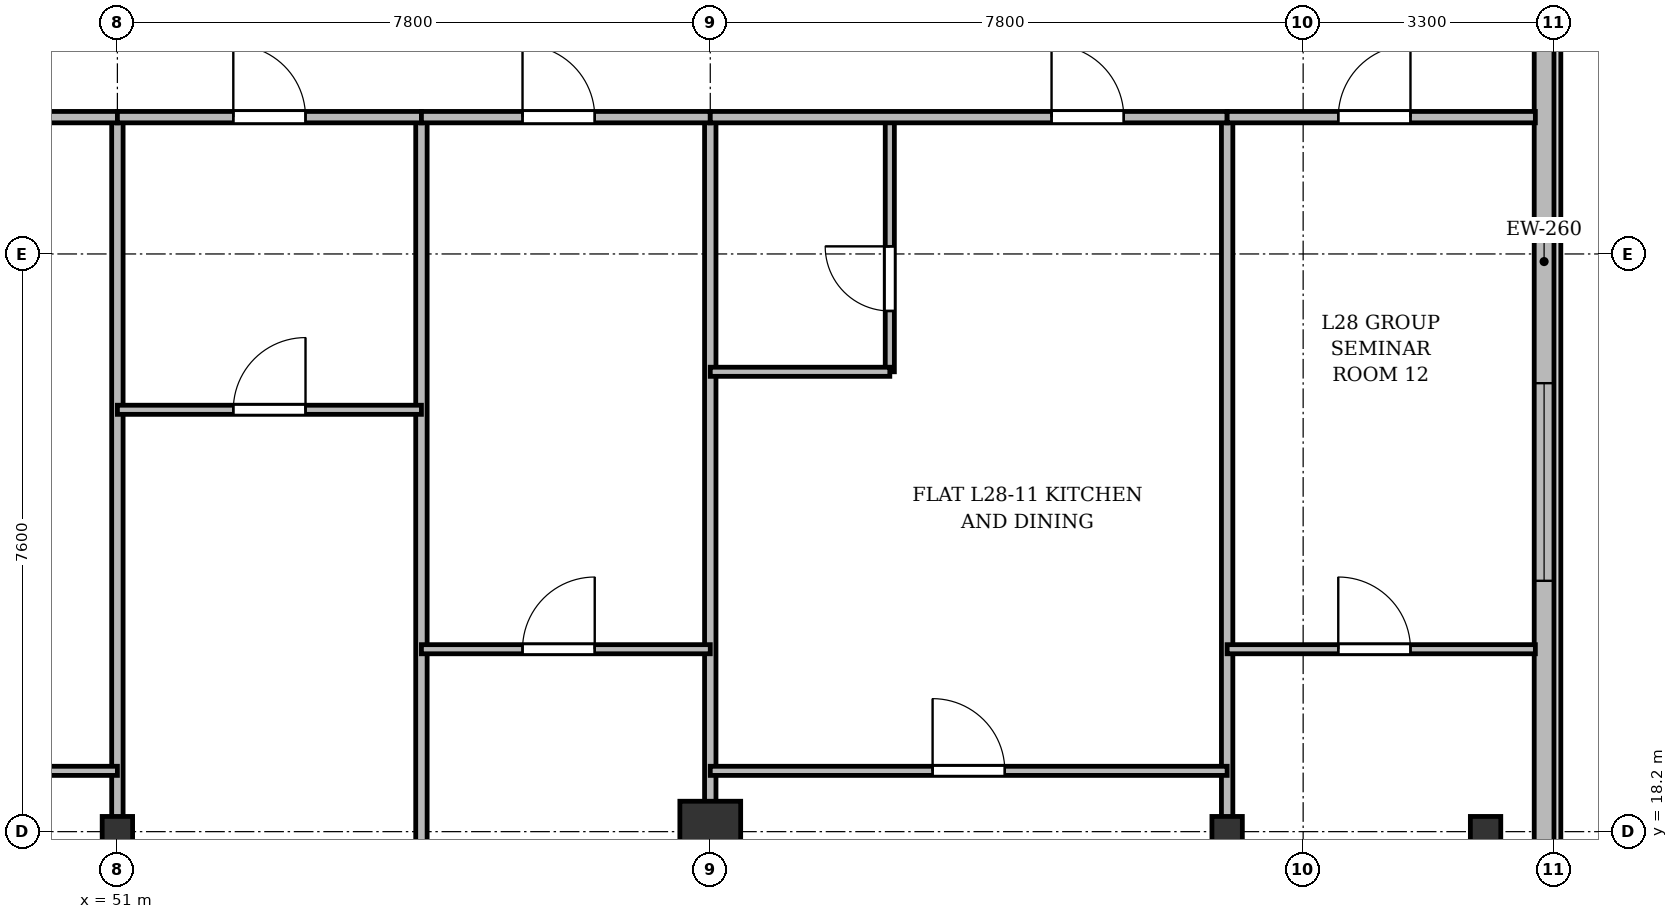
"""IFC4 building model, lengths in metres.
Left out: names, types, materials, properties, quantities, classifications, styles, units other than length and angle.
Written with IfcOpenShell. Run it as: python <this file> out.ifc"""

import sys

from ifc_helpers import new_model, si_unit, direction, frame, frame_2d, origin, origin_2d, place, context, subcontext, project, spatial, rectangle, i_section, extrude, source, transform, mapped, element, fill, save


model = new_model("IFC4")
c1 = context("Model", 3, precision=1e-05, world=origin(), true_north=direction((0.0, 1.0)))
c2 = subcontext(c1, "Body", "Model", "MODEL_VIEW")
j1 = project(units=[si_unit("LENGTHUNIT", "METRE"), si_unit("PLANEANGLEUNIT", "RADIAN")], contexts=[c1])
p1 = place(None, origin())
s1 = spatial("IfcSite", under=j1, at=p1, CompositionType="ELEMENT")
p2 = place(p1, origin())
s2 = spatial("IfcBuilding", under=s1, at=p2, CompositionType="ELEMENT")
p3 = place(p2, frame((0.0, 0.0, 110.5)))
s3 = spatial("IfcBuildingStorey", under=s2, at=p3, CompositionType="ELEMENT", Elevation=110.5)
m1 = source(origin(), c2, "Body", "SweptSolid", [
    extrude(i_section(OverallWidth=0.4, OverallDepth=0.4, WebThickness=0.022, FlangeThickness=0.035, at=origin_2d()), origin(), (0.0, 0.0, 1.0), 3.6),
])
p4 = place(p3, frame((51.0, 18.2, 0.0), z_axis=(0.0, 0.0, 1.0), x_axis=(1.0, 0.0, 0.0)))
e1 = element("IfcColumn", 1, at=p4, inside=s3, PredefinedType="COLUMN", context=c2, shape_type="MappedRepresentation", body=[
    mapped(m1, transform((0.0, 0.0, 0.0), x_axis=(1.0, 0.0, 0.0), y_axis=(0.0, 1.0, 0.0), z_axis=(0.0, 0.0, 1.0), scale=1.0)),
])
m2 = source(origin(), c2, "Body", "SweptSolid", [
    extrude(rectangle(XDim=0.8, YDim=0.8, at=origin_2d()), origin(), (0.0, 0.0, 1.0), 3.6),
])
p5 = place(p3, frame((58.8, 18.2, 0.0), z_axis=(0.0, 0.0, 1.0), x_axis=(1.0, 0.0, 0.0)))
e2 = element("IfcColumn", 2, at=p5, inside=s3, PredefinedType="COLUMN", context=c2, shape_type="MappedRepresentation", body=[
    mapped(m2, transform((0.0, 0.0, 0.0), x_axis=(1.0, 0.0, 0.0), y_axis=(0.0, 1.0, 0.0), z_axis=(0.0, 0.0, 1.0), scale=1.0)),
])
for number, where, z_axis, x_axis in (
    (3, (65.6, 18.2, 0.0), (0.0, 0.0, 1.0), (1.0, 0.0, 0.0)),
    (4, (69.0, 18.2, 0.0), (0.0, 0.0, 1.0), (1.0, 0.0, 0.0)),
):
    element("IfcColumn", number, at=place(p3, frame(where, z_axis=z_axis, x_axis=x_axis)), inside=s3, PredefinedType="COLUMN", context=c2, shape_type="MappedRepresentation", body=[
        mapped(m1, transform((0.0, 0.0, 0.0), x_axis=(1.0, 0.0, 0.0), y_axis=(0.0, 1.0, 0.0), z_axis=(0.0, 0.0, 1.0), scale=1.0)),
    ])
p6 = place(p3, frame((69.77, 45.5, 0.0), z_axis=(0.0, 0.0, 1.0), x_axis=(0.0, -1.0, 0.0)))
e5 = element("IfcWall", 5, at=p6, inside=s3, PredefinedType="SOLIDWALL", context=c2, shape_type="SweptSolid", body=[
    extrude(rectangle(XDim=39.6, YDim=0.26, at=frame_2d((19.8, 0.0))), origin(), (0.0, 0.0, 1.0), 3.34),
])
p7 = place(p6, frame((36.95, 0.0, 0.92)))
e6 = element("IfcOpeningElement", 6, at=p7, cuts=e5, PredefinedType="OPENING", context=c2, shape_type="SweptSolid", body=[
    extrude(rectangle(XDim=1.2, YDim=1.65, at=frame_2d((0.6, 0.825))), frame((0.0, 0.14, 0.0), z_axis=(0.0, -1.0, 0.0), x_axis=(1.0, 0.0, 0.0)), (0.0, 0.0, 1.0), 0.28),
])
p8 = place(p6, frame((32.8, 0.0, 0.92)))
e7 = element("IfcOpeningElement", 7, at=p8, cuts=e5, PredefinedType="OPENING", context=c2, shape_type="SweptSolid", body=[
    extrude(rectangle(XDim=2.6, YDim=1.9, at=frame_2d((1.3, 0.95))), frame((0.0, 0.14, 0.0), z_axis=(0.0, -1.0, 0.0), x_axis=(1.0, 0.0, 0.0)), (0.0, 0.0, 1.0), 0.28),
])
p9 = place(p6, frame((28.6, 0.0, 0.92)))
e8 = element("IfcOpeningElement", 8, at=p9, cuts=e5, PredefinedType="OPENING", context=c2, shape_type="SweptSolid", body=[
    extrude(rectangle(XDim=2.6, YDim=1.9, at=frame_2d((1.3, 0.95))), frame((0.0, 0.14, 0.0), z_axis=(0.0, -1.0, 0.0), x_axis=(1.0, 0.0, 0.0)), (0.0, 0.0, 1.0), 0.28),
])
p10 = place(p6, frame((21.4, 0.0, 0.92)))
e9 = element("IfcOpeningElement", 9, at=p10, cuts=e5, PredefinedType="OPENING", context=c2, shape_type="SweptSolid", body=[
    extrude(rectangle(XDim=2.6, YDim=1.9, at=frame_2d((1.3, 0.95))), frame((0.0, 0.14, 0.0), z_axis=(0.0, -1.0, 0.0), x_axis=(1.0, 0.0, 0.0)), (0.0, 0.0, 1.0), 0.28),
])
p11 = place(p6, frame((7.4, 0.0, 0.92)))
e10 = element("IfcOpeningElement", 10, at=p11, cuts=e5, PredefinedType="OPENING", context=c2, shape_type="SweptSolid", body=[
    extrude(rectangle(XDim=2.6, YDim=1.9, at=frame_2d((1.3, 0.95))), frame((0.0, 0.14, 0.0), z_axis=(0.0, -1.0, 0.0), x_axis=(1.0, 0.0, 0.0)), (0.0, 0.0, 1.0), 0.28),
])
p12 = place(p6, frame((4.5, 0.0, 0.92)))
e11 = element("IfcOpeningElement", 11, at=p12, cuts=e5, PredefinedType="OPENING", context=c2, shape_type="SweptSolid", body=[
    extrude(rectangle(XDim=1.2, YDim=1.65, at=frame_2d((0.6, 0.825))), frame((0.0, 0.14, 0.0), z_axis=(0.0, -1.0, 0.0), x_axis=(1.0, 0.0, 0.0)), (0.0, 0.0, 1.0), 0.28),
])
p13 = place(p6, frame((1.15, 0.0, 0.92)))
e12 = element("IfcOpeningElement", 12, at=p13, cuts=e5, PredefinedType="OPENING", context=c2, shape_type="SweptSolid", body=[
    extrude(rectangle(XDim=1.2, YDim=1.65, at=frame_2d((0.6, 0.825))), frame((0.0, 0.14, 0.0), z_axis=(0.0, -1.0, 0.0), x_axis=(1.0, 0.0, 0.0)), (0.0, 0.0, 1.0), 0.28),
])
p14 = place(p3, frame((51.0, 3.145, 0.0), z_axis=(0.0, 0.0, 1.0), x_axis=(0.0, 1.0, 0.0)))
e13 = element("IfcWall", 13, at=p14, inside=s3, PredefinedType="PARTITIONING", context=c2, shape_type="SweptSolid", body=[
    extrude(rectangle(XDim=24.455, YDim=0.15, at=frame_2d((12.228, 0.0))), origin(), (0.0, 0.0, 1.0), 2.84),
])
p15 = place(p3, frame((55.0, 3.145, 0.0), z_axis=(0.0, 0.0, 1.0), x_axis=(0.0, 1.0, 0.0)))
e14 = element("IfcWall", 14, at=p15, inside=s3, PredefinedType="PARTITIONING", context=c2, shape_type="SweptSolid", body=[
    extrude(rectangle(XDim=24.455, YDim=0.15, at=frame_2d((12.228, 0.0))), origin(), (0.0, 0.0, 1.0), 2.752),
])
for number, where, z_axis, x_axis in (
    (15, (58.8, 3.145, 0.0), (0.0, 0.0, 1.0), (0.0, 1.0, 0.0)),
    (16, (65.6, 3.145, 0.0), (0.0, 0.0, 1.0), (0.0, 1.0, 0.0)),
):
    element("IfcWall", number, at=place(p3, frame(where, z_axis=z_axis, x_axis=x_axis)), inside=s3, PredefinedType="PARTITIONING", context=c2, shape_type="SweptSolid", body=[
        extrude(rectangle(XDim=24.455, YDim=0.15, at=frame_2d((12.228, 0.0))), origin(), (0.0, 0.0, 1.0), 2.84),
    ])
p16 = place(p3, frame((43.8, 19.0, 0.0), z_axis=(0.0, 0.0, 1.0), x_axis=(1.0, 0.0, 0.0)))
e17 = element("IfcWall", 17, at=p16, inside=s3, PredefinedType="PARTITIONING", context=c2, shape_type="SweptSolid", body=[
    extrude(rectangle(XDim=7.2, YDim=0.12, at=frame_2d((3.6, 0.0))), origin(), (0.0, 0.0, 1.0), 2.84),
])
p17 = place(p16, frame((3.125, 0.0, 0.0)))
e18 = element("IfcOpeningElement", 18, at=p17, cuts=e17, PredefinedType="OPENING", context=c2, shape_type="SweptSolid", body=[
    extrude(rectangle(XDim=0.95, YDim=2.15, at=frame_2d((0.475, 1.075))), frame((0.0, 0.07, 0.0), z_axis=(0.0, -1.0, 0.0), x_axis=(1.0, 0.0, 0.0)), (0.0, 0.0, 1.0), 0.14),
])
p18 = place(p3, frame((43.8, 27.6, 0.0), z_axis=(0.0, 0.0, 1.0), x_axis=(1.0, 0.0, 0.0)))
e19 = element("IfcWall", 19, at=p18, inside=s3, PredefinedType="PARTITIONING", context=c2, shape_type="SweptSolid", body=[
    extrude(rectangle(XDim=7.2, YDim=0.15, at=frame_2d((3.6, 0.0))), origin(), (0.0, 0.0, 1.0), 2.84),
])
p19 = place(p18, frame((4.706, 0.0, 0.0)))
e20 = element("IfcOpeningElement", 20, at=p19, cuts=e19, PredefinedType="OPENING", context=c2, shape_type="SweptSolid", body=[
    extrude(rectangle(XDim=0.95, YDim=2.15, at=frame_2d((0.475, 1.075))), frame((0.0, 0.085, 0.0), z_axis=(0.0, -1.0, 0.0), x_axis=(1.0, 0.0, 0.0)), (0.0, 0.0, 1.0), 0.17),
])
p20 = place(p3, frame((51.0, 27.6, 0.0), z_axis=(0.0, 0.0, 1.0), x_axis=(1.0, 0.0, 0.0)))
e21 = element("IfcWall", 21, at=p20, inside=s3, PredefinedType="PARTITIONING", context=c2, shape_type="SweptSolid", body=[
    extrude(rectangle(XDim=4.0, YDim=0.15, at=frame_2d((2.0, 0.0))), origin(), (0.0, 0.0, 1.0), 2.84),
])
p21 = place(p20, frame((1.525, 0.0, 0.0)))
e22 = element("IfcOpeningElement", 22, at=p21, cuts=e21, PredefinedType="OPENING", context=c2, shape_type="SweptSolid", body=[
    extrude(rectangle(XDim=0.95, YDim=2.15, at=frame_2d((0.475, 1.075))), frame((0.0, 0.085, 0.0), z_axis=(0.0, -1.0, 0.0), x_axis=(1.0, 0.0, 0.0)), (0.0, 0.0, 1.0), 0.17),
])
p22 = place(p3, frame((51.0, 23.75, 0.0), z_axis=(0.0, 0.0, 1.0), x_axis=(1.0, 0.0, 0.0)))
e23 = element("IfcWall", 23, at=p22, inside=s3, PredefinedType="PARTITIONING", context=c2, shape_type="SweptSolid", body=[
    extrude(rectangle(XDim=4.0, YDim=0.12, at=frame_2d((2.0, 0.0))), origin(), (0.0, 0.0, 1.0), 2.84),
])
p23 = place(p22, frame((1.525, 0.0, 0.0)))
e24 = element("IfcOpeningElement", 24, at=p23, cuts=e23, PredefinedType="OPENING", context=c2, shape_type="SweptSolid", body=[
    extrude(rectangle(XDim=0.95, YDim=2.15, at=frame_2d((0.475, 1.075))), frame((0.0, 0.07, 0.0), z_axis=(0.0, -1.0, 0.0), x_axis=(1.0, 0.0, 0.0)), (0.0, 0.0, 1.0), 0.14),
])
p24 = place(p3, frame((55.0, 27.6, 0.0), z_axis=(0.0, 0.0, 1.0), x_axis=(1.0, 0.0, 0.0)))
e25 = element("IfcWall", 25, at=p24, inside=s3, PredefinedType="PARTITIONING", context=c2, shape_type="SweptSolid", body=[
    extrude(rectangle(XDim=3.8, YDim=0.15, at=frame_2d((1.9, 0.0))), origin(), (0.0, 0.0, 1.0), 2.84),
])
p25 = place(p24, frame((1.33, 0.0, 0.0)))
e26 = element("IfcOpeningElement", 26, at=p25, cuts=e25, PredefinedType="OPENING", context=c2, shape_type="SweptSolid", body=[
    extrude(rectangle(XDim=0.95, YDim=2.15, at=frame_2d((0.475, 1.075))), frame((0.0, 0.085, 0.0), z_axis=(0.0, -1.0, 0.0), x_axis=(1.0, 0.0, 0.0)), (0.0, 0.0, 1.0), 0.17),
])
p26 = place(p3, frame((55.0, 20.6, 0.0), z_axis=(0.0, 0.0, 1.0), x_axis=(1.0, 0.0, 0.0)))
e27 = element("IfcWall", 27, at=p26, inside=s3, PredefinedType="PARTITIONING", context=c2, shape_type="SweptSolid", body=[
    extrude(rectangle(XDim=3.8, YDim=0.12, at=frame_2d((1.9, 0.0))), origin(), (0.0, 0.0, 1.0), 2.84),
])
p27 = place(p26, frame((1.33, 0.0, 0.0)))
e28 = element("IfcOpeningElement", 28, at=p27, cuts=e27, PredefinedType="OPENING", context=c2, shape_type="SweptSolid", body=[
    extrude(rectangle(XDim=0.95, YDim=2.15, at=frame_2d((0.475, 1.075))), frame((0.0, 0.07, 0.0), z_axis=(0.0, -1.0, 0.0), x_axis=(1.0, 0.0, 0.0)), (0.0, 0.0, 1.0), 0.14),
])
p28 = place(p3, frame((58.8, 19.0, 0.0), z_axis=(0.0, 0.0, 1.0), x_axis=(1.0, 0.0, 0.0)))
e29 = element("IfcWall", 29, at=p28, inside=s3, PredefinedType="PARTITIONING", context=c2, shape_type="SweptSolid", body=[
    extrude(rectangle(XDim=6.8, YDim=0.12, at=frame_2d((3.4, 0.0))), origin(), (0.0, 0.0, 1.0), 2.84),
])
p29 = place(p28, frame((2.925, 0.0, 0.0)))
e30 = element("IfcOpeningElement", 30, at=p29, cuts=e29, PredefinedType="OPENING", context=c2, shape_type="SweptSolid", body=[
    extrude(rectangle(XDim=0.95, YDim=2.15, at=frame_2d((0.475, 1.075))), frame((0.0, 0.07, 0.0), z_axis=(0.0, -1.0, 0.0), x_axis=(1.0, 0.0, 0.0)), (0.0, 0.0, 1.0), 0.14),
])
p30 = place(p3, frame((61.162, 24.25, 0.0), z_axis=(0.0, 0.0, 1.0), x_axis=(0.0, 1.0, 0.0)))
e31 = element("IfcWall", 31, at=p30, inside=s3, PredefinedType="PARTITIONING", context=c2, shape_type="SweptSolid", body=[
    extrude(rectangle(XDim=3.35, YDim=0.12, at=frame_2d((1.675, 0.0))), origin(), (0.0, 0.0, 1.0), 2.99),
])
p31 = place(p30, frame((0.8, 0.0, 0.0)))
e32 = element("IfcOpeningElement", 32, at=p31, cuts=e31, PredefinedType="OPENING", context=c2, shape_type="SweptSolid", body=[
    extrude(rectangle(XDim=0.85, YDim=2.1, at=frame_2d((0.425, 1.05))), frame((0.0, 0.07, 0.0), z_axis=(0.0, -1.0, 0.0), x_axis=(1.0, 0.0, 0.0)), (0.0, 0.0, 1.0), 0.14),
])
p32 = place(p3, frame((58.8, 24.25, 0.0), z_axis=(0.0, 0.0, 1.0), x_axis=(1.0, 0.0, 0.0)))
e33 = element("IfcWall", 33, at=p32, inside=s3, PredefinedType="PARTITIONING", context=c2, shape_type="SweptSolid", body=[
    extrude(rectangle(XDim=2.362, YDim=0.12, at=frame_2d((1.181, 0.0))), origin(), (0.0, 0.0, 1.0), 2.84),
])
p33 = place(p3, frame((58.8, 27.6, 0.0), z_axis=(0.0, 0.0, 1.0), x_axis=(1.0, 0.0, 0.0)))
e34 = element("IfcWall", 34, at=p33, inside=s3, PredefinedType="PARTITIONING", context=c2, shape_type="SweptSolid", body=[
    extrude(rectangle(XDim=6.8, YDim=0.15, at=frame_2d((3.4, 0.0))), origin(), (0.0, 0.0, 1.0), 2.84),
])
p34 = place(p33, frame((4.49, 0.0, 0.0)))
e35 = element("IfcOpeningElement", 35, at=p34, cuts=e34, PredefinedType="OPENING", context=c2, shape_type="SweptSolid", body=[
    extrude(rectangle(XDim=0.95, YDim=2.15, at=frame_2d((0.475, 1.075))), frame((0.0, 0.085, 0.0), z_axis=(0.0, -1.0, 0.0), x_axis=(1.0, 0.0, 0.0)), (0.0, 0.0, 1.0), 0.17),
])
p35 = place(p3, frame((65.6, 27.6, 0.0), z_axis=(0.0, 0.0, 1.0), x_axis=(1.0, 0.0, 0.0)))
e36 = element("IfcWall", 36, at=p35, inside=s3, PredefinedType="PARTITIONING", context=c2, shape_type="SweptSolid", body=[
    extrude(rectangle(XDim=4.055, YDim=0.15, at=frame_2d((2.027, 0.0))), origin(), (0.0, 0.0, 1.0), 2.84),
])
p36 = place(p35, frame((1.462, 0.0, 0.0)))
e37 = element("IfcOpeningElement", 37, at=p36, cuts=e36, PredefinedType="OPENING", context=c2, shape_type="SweptSolid", body=[
    extrude(rectangle(XDim=0.95, YDim=2.15, at=frame_2d((0.475, 1.075))), frame((0.0, 0.085, 0.0), z_axis=(0.0, -1.0, 0.0), x_axis=(1.0, 0.0, 0.0)), (0.0, 0.0, 1.0), 0.17),
])
p37 = place(p3, frame((65.6, 20.6, 0.0), z_axis=(0.0, 0.0, 1.0), x_axis=(1.0, 0.0, 0.0)))
e38 = element("IfcWall", 38, at=p37, inside=s3, PredefinedType="PARTITIONING", context=c2, shape_type="SweptSolid", body=[
    extrude(rectangle(XDim=4.055, YDim=0.12, at=frame_2d((2.027, 0.0))), origin(), (0.0, 0.0, 1.0), 2.84),
])
p38 = place(p37, frame((1.462, 0.0, 0.0)))
e39 = element("IfcOpeningElement", 39, at=p38, cuts=e38, PredefinedType="OPENING", context=c2, shape_type="SweptSolid", body=[
    extrude(rectangle(XDim=0.95, YDim=2.15, at=frame_2d((0.475, 1.075))), frame((0.0, 0.07, 0.0), z_axis=(0.0, -1.0, 0.0), x_axis=(1.0, 0.0, 0.0)), (0.0, 0.0, 1.0), 0.14),
])
m3 = source(origin(), c2, "Body", "SweptSolid", [
    extrude(rectangle(XDim=2.6, YDim=1.9, at=frame_2d((1.3, 0.95))), frame((0.0, 0.03, 0.0), z_axis=(0.0, -1.0, 0.0), x_axis=(1.0, 0.0, 0.0)), (0.0, 0.0, 1.0), 0.06),
])
p39 = place(p10, origin())
e40 = element("IfcWindow", 40, at=p39, inside=s3, PartitioningType="SINGLE_PANEL", PredefinedType="WINDOW", context=c2, shape_type="MappedRepresentation", body=[
    mapped(m3, transform((0.0, 0.0, 0.0), x_axis=(1.0, 0.0, 0.0), y_axis=(0.0, 1.0, 0.0), z_axis=(0.0, 0.0, 1.0), scale=1.0)),
])
fill(e9, e40)
m4 = source(origin(), c2, "Body", "SweptSolid", [
    extrude(rectangle(XDim=0.95, YDim=2.15, at=frame_2d((0.475, 1.075))), frame((0.0, 0.025, 0.0), z_axis=(0.0, -1.0, 0.0), x_axis=(1.0, 0.0, 0.0)), (0.0, 0.0, 1.0), 0.05),
])
p40 = place(p21, origin())
e41 = element("IfcDoor", 41, at=p40, inside=s3, OperationType="SINGLE_SWING_LEFT", PredefinedType="DOOR", context=c2, shape_type="MappedRepresentation", body=[
    mapped(m4, transform((0.0, 0.0, 0.0), x_axis=(1.0, 0.0, 0.0), y_axis=(0.0, 1.0, 0.0), z_axis=(0.0, 0.0, 1.0), scale=1.0)),
])
fill(e22, e41)
p41 = place(p23, origin())
e42 = element("IfcDoor", 42, at=p41, inside=s3, OperationType="SINGLE_SWING_RIGHT", PredefinedType="DOOR", context=c2, shape_type="MappedRepresentation", body=[
    mapped(m4, transform((0.0, 0.0, 0.0), x_axis=(1.0, 0.0, 0.0), y_axis=(0.0, 1.0, 0.0), z_axis=(0.0, 0.0, 1.0), scale=1.0)),
])
fill(e24, e42)
p42 = place(p25, origin())
e43 = element("IfcDoor", 43, at=p42, inside=s3, OperationType="SINGLE_SWING_LEFT", PredefinedType="DOOR", context=c2, shape_type="MappedRepresentation", body=[
    mapped(m4, transform((0.0, 0.0, 0.0), x_axis=(1.0, 0.0, 0.0), y_axis=(0.0, 1.0, 0.0), z_axis=(0.0, 0.0, 1.0), scale=1.0)),
])
fill(e26, e43)
p43 = place(p27, origin())
e44 = element("IfcDoor", 44, at=p43, inside=s3, OperationType="SINGLE_SWING_RIGHT", PredefinedType="DOOR", context=c2, shape_type="MappedRepresentation", body=[
    mapped(m4, transform((0.0, 0.0, 0.0), x_axis=(1.0, 0.0, 0.0), y_axis=(0.0, 1.0, 0.0), z_axis=(0.0, 0.0, 1.0), scale=1.0)),
])
fill(e28, e44)
p44 = place(p29, origin())
e45 = element("IfcDoor", 45, at=p44, inside=s3, OperationType="SINGLE_SWING_LEFT", PredefinedType="DOOR", context=c2, shape_type="MappedRepresentation", body=[
    mapped(m4, transform((0.0, 0.0, 0.0), x_axis=(1.0, 0.0, 0.0), y_axis=(0.0, 1.0, 0.0), z_axis=(0.0, 0.0, 1.0), scale=1.0)),
])
fill(e30, e45)
m5 = source(origin(), c2, "Body", "SweptSolid", [
    extrude(rectangle(XDim=0.85, YDim=2.1, at=frame_2d((0.425, 1.05))), frame((0.0, 0.025, 0.0), z_axis=(0.0, -1.0, 0.0), x_axis=(1.0, 0.0, 0.0)), (0.0, 0.0, 1.0), 0.05),
])
p45 = place(p31, origin())
e46 = element("IfcDoor", 46, at=p45, inside=s3, OperationType="SINGLE_SWING_RIGHT", PredefinedType="DOOR", context=c2, shape_type="MappedRepresentation", body=[
    mapped(m5, transform((0.0, 0.0, 0.0), x_axis=(1.0, 0.0, 0.0), y_axis=(0.0, 1.0, 0.0), z_axis=(0.0, 0.0, 1.0), scale=1.0)),
])
fill(e32, e46)
p46 = place(p34, origin())
e47 = element("IfcDoor", 47, at=p46, inside=s3, OperationType="SINGLE_SWING_LEFT", PredefinedType="DOOR", context=c2, shape_type="MappedRepresentation", body=[
    mapped(m4, transform((0.0, 0.0, 0.0), x_axis=(1.0, 0.0, 0.0), y_axis=(0.0, 1.0, 0.0), z_axis=(0.0, 0.0, 1.0), scale=1.0)),
])
fill(e35, e47)
p47 = place(p36, origin())
e48 = element("IfcDoor", 48, at=p47, inside=s3, OperationType="SINGLE_SWING_RIGHT", PredefinedType="DOOR", context=c2, shape_type="MappedRepresentation", body=[
    mapped(m4, transform((0.0, 0.0, 0.0), x_axis=(1.0, 0.0, 0.0), y_axis=(0.0, 1.0, 0.0), z_axis=(0.0, 0.0, 1.0), scale=1.0)),
])
fill(e37, e48)
p48 = place(p38, origin())
e49 = element("IfcDoor", 49, at=p48, inside=s3, OperationType="SINGLE_SWING_LEFT", PredefinedType="DOOR", context=c2, shape_type="MappedRepresentation", body=[
    mapped(m4, transform((0.0, 0.0, 0.0), x_axis=(1.0, 0.0, 0.0), y_axis=(0.0, 1.0, 0.0), z_axis=(0.0, 0.0, 1.0), scale=1.0)),
])
fill(e39, e49)
save(model, sys.argv[1])
